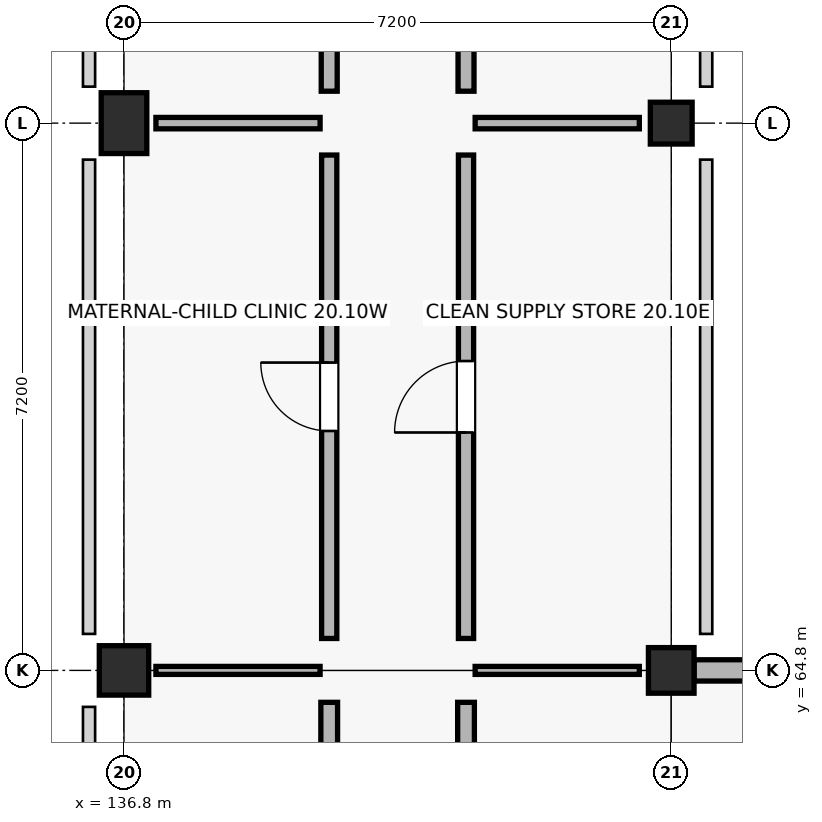
"""IFC4 building model, lengths in metres.
Left out: names, types, materials, properties, quantities, classifications, styles, units other than length and angle.
Written with IfcOpenShell. Run it as: python <this file> out.ifc"""

import sys

from ifc_helpers import new_model, si_unit, direction, frame, frame_2d, origin, origin_2d, place, context, subcontext, project, spatial, rectangle, circle, extrude, element, fill, save


model = new_model("IFC4")
c1 = context("Model", 3, precision=1e-05, world=origin(), true_north=direction((0.0, 1.0)))
c2 = subcontext(c1, "Body", "Model", "MODEL_VIEW")
j1 = project(units=[si_unit("LENGTHUNIT", "METRE"), si_unit("PLANEANGLEUNIT", "RADIAN")], contexts=[c1])
p1 = place(None, origin())
s1 = spatial("IfcSite", under=j1, at=p1, CompositionType="ELEMENT")
p2 = place(p1, origin())
s2 = spatial("IfcBuilding", under=s1, at=p2, CompositionType="ELEMENT")
p3 = place(p2, frame((0.0, 0.0, 4.5)))
s3 = spatial("IfcBuildingStorey", under=s2, at=p3, CompositionType="ELEMENT", Elevation=4.5)
p4 = place(p3, frame((136.8, 64.8, 0.0), z_axis=(0.0, 0.0, 1.0), x_axis=(1.0, 0.0, 0.0)))
e1 = element("IfcColumn", 1, at=p4, inside=s3, PredefinedType="COLUMN", context=c2, shape_type="SweptSolid", body=[
    extrude(circle(Radius=0.325, at=origin_2d()), origin(), (0.0, 0.0, 1.0), 4.5),
])
p5 = place(p3, frame((136.8, 72.0, 0.0), z_axis=(0.0, 0.0, 1.0), x_axis=(1.0, 0.0, 0.0)))
e2 = element("IfcColumn", 2, at=p5, inside=s3, PredefinedType="PILASTER", context=c2, shape_type="SweptSolid", body=[
    extrude(rectangle(XDim=0.6, YDim=0.8, at=origin_2d()), origin(), (0.0, 0.0, 1.0), 4.5),
])
p6 = place(p3, frame((144.0, 64.8, 0.0), z_axis=(0.0, 0.0, 1.0), x_axis=(1.0, 0.0, 0.0)))
e3 = element("IfcColumn", 3, at=p6, inside=s3, PredefinedType="COLUMN", context=c2, shape_type="SweptSolid", body=[
    extrude(rectangle(XDim=0.6, YDim=0.6, at=origin_2d()), origin(), (0.0, 0.0, 1.0), 4.5),
])
p7 = place(p3, frame((144.0, 72.0, 0.0), z_axis=(0.0, 0.0, 1.0), x_axis=(1.0, 0.0, 0.0)))
e4 = element("IfcColumn", 4, at=p7, inside=s3, PredefinedType="COLUMN", context=c2, shape_type="SweptSolid", body=[
    extrude(rectangle(XDim=0.55, YDim=0.55, at=origin_2d()), origin(), (0.0, 0.0, 1.0), 4.5),
])
p8 = place(p3, frame((150.9, 64.8, 0.0), z_axis=(0.0, 0.0, 1.0), x_axis=(-1.0, 0.0, 0.0)))
e5 = element("IfcWall", 5, at=p8, inside=s3, PredefinedType="STANDARD", context=c2, shape_type="SweptSolid", body=[
    extrude(rectangle(XDim=6.6, YDim=0.28, at=frame_2d((3.3, 0.0))), origin(), (0.0, 0.0, 1.0), 3.47),
])
p9 = place(p8, frame((0.775, 0.0, 0.9)))
e6 = element("IfcOpeningElement", 6, at=p9, cuts=e5, PredefinedType="OPENING", context=c2, shape_type="SweptSolid", body=[
    extrude(rectangle(XDim=1.95, YDim=1.75, at=frame_2d((0.975, 0.875))), frame((0.0, 0.15, 0.0), z_axis=(0.0, -1.0, 0.0), x_axis=(1.0, 0.0, 0.0)), (0.0, 0.0, 1.0), 0.3),
])
p10 = place(p8, frame((3.875, 0.0, 0.9)))
e7 = element("IfcOpeningElement", 7, at=p10, cuts=e5, PredefinedType="OPENING", context=c2, shape_type="SweptSolid", body=[
    extrude(rectangle(XDim=1.95, YDim=1.75, at=frame_2d((0.975, 0.875))), frame((0.0, 0.15, 0.0), z_axis=(0.0, -1.0, 0.0), x_axis=(1.0, 0.0, 0.0)), (0.0, 0.0, 1.0), 0.3),
])
p11 = place(p3, frame((139.5, 58.02, 0.0), z_axis=(0.0, 0.0, 1.0), x_axis=(0.0, 1.0, 0.0)))
e8 = element("IfcWall", 8, at=p11, inside=s3, PredefinedType="SOLIDWALL", context=c2, shape_type="SweptSolid", body=[
    extrude(rectangle(XDim=6.36, YDim=0.22, at=frame_2d((3.18, 0.0))), origin(), (0.0, 0.0, 1.0), 3.36),
])
p12 = place(p11, frame((2.45, 0.0, 0.0)))
e9 = element("IfcOpeningElement", 9, at=p12, cuts=e8, PredefinedType="OPENING", context=c2, shape_type="SweptSolid", body=[
    extrude(rectangle(XDim=1.46, YDim=2.09, at=frame_2d((0.73, 1.045))), frame((0.0, 0.12, 0.0), z_axis=(0.0, -1.0, 0.0), x_axis=(1.0, 0.0, 0.0)), (0.0, 0.0, 1.0), 0.24),
])
p13 = place(p3, frame((137.22, 64.8, 0.0), z_axis=(0.0, 0.0, 1.0), x_axis=(1.0, 0.0, 0.0)))
e10 = element("IfcWall", 10, at=p13, inside=s3, PredefinedType="PARTITIONING", context=c2, shape_type="SweptSolid", body=[
    extrude(rectangle(XDim=2.16, YDim=0.105, at=frame_2d((1.08, 0.0))), origin(), (0.0, 0.0, 1.0), 3.36),
])
p14 = place(p3, frame((141.3, 58.02, 0.0), z_axis=(0.0, 0.0, 1.0), x_axis=(0.0, 1.0, 0.0)))
e11 = element("IfcWall", 11, at=p14, inside=s3, PredefinedType="SOLIDWALL", context=c2, shape_type="SweptSolid", body=[
    extrude(rectangle(XDim=6.36, YDim=0.22, at=frame_2d((3.18, 0.0))), origin(), (0.0, 0.0, 1.0), 3.36),
])
p15 = place(p14, frame((2.43, 0.0, 0.0)))
e12 = element("IfcOpeningElement", 12, at=p15, cuts=e11, PredefinedType="OPENING", context=c2, shape_type="SweptSolid", body=[
    extrude(rectangle(XDim=1.5, YDim=2.09, at=frame_2d((0.75, 1.045))), frame((0.0, 0.12, 0.0), z_axis=(0.0, -1.0, 0.0), x_axis=(1.0, 0.0, 0.0)), (0.0, 0.0, 1.0), 0.24),
])
p16 = place(p3, frame((141.42, 64.8, 0.0), z_axis=(0.0, 0.0, 1.0), x_axis=(1.0, 0.0, 0.0)))
e13 = element("IfcWall", 13, at=p16, inside=s3, PredefinedType="PARTITIONING", context=c2, shape_type="SweptSolid", body=[
    extrude(rectangle(XDim=2.16, YDim=0.105, at=frame_2d((1.08, 0.0))), origin(), (0.0, 0.0, 1.0), 3.36),
])
p17 = place(p3, frame((139.5, 65.22, 0.0), z_axis=(0.0, 0.0, 1.0), x_axis=(0.0, 1.0, 0.0)))
e14 = element("IfcWall", 14, at=p17, inside=s3, PredefinedType="SOLIDWALL", context=c2, shape_type="SweptSolid", body=[
    extrude(rectangle(XDim=6.36, YDim=0.2, at=frame_2d((3.18, 0.0))), origin(), (0.0, 0.0, 1.0), 3.36),
])
p18 = place(p17, frame((2.73, 0.0, 0.0)))
e15 = element("IfcOpeningElement", 15, at=p18, cuts=e14, PredefinedType="OPENING", context=c2, shape_type="SweptSolid", body=[
    extrude(rectangle(XDim=0.9, YDim=2.14, at=frame_2d((0.45, 1.07))), frame((0.0, 0.11, 0.0), z_axis=(0.0, -1.0, 0.0), x_axis=(1.0, 0.0, 0.0)), (0.0, 0.0, 1.0), 0.22),
])
p19 = place(p3, frame((137.22, 72.0, 0.0), z_axis=(0.0, 0.0, 1.0), x_axis=(1.0, 0.0, 0.0)))
e16 = element("IfcWall", 16, at=p19, inside=s3, PredefinedType="PARTITIONING", context=c2, shape_type="SweptSolid", body=[
    extrude(rectangle(XDim=2.16, YDim=0.15, at=frame_2d((1.08, 0.0))), origin(), (0.0, 0.0, 1.0), 3.36),
])
p20 = place(p3, frame((141.3, 65.22, 0.0), z_axis=(0.0, 0.0, 1.0), x_axis=(0.0, 1.0, 0.0)))
e17 = element("IfcWall", 17, at=p20, inside=s3, PredefinedType="SOLIDWALL", context=c2, shape_type="SweptSolid", body=[
    extrude(rectangle(XDim=6.36, YDim=0.2, at=frame_2d((3.18, 0.0))), origin(), (0.0, 0.0, 1.0), 3.36),
])
p21 = place(p20, frame((2.71, 0.0, 0.0)))
e18 = element("IfcOpeningElement", 18, at=p21, cuts=e17, PredefinedType="OPENING", context=c2, shape_type="SweptSolid", body=[
    extrude(rectangle(XDim=0.94, YDim=2.14, at=frame_2d((0.47, 1.07))), frame((0.0, 0.11, 0.0), z_axis=(0.0, -1.0, 0.0), x_axis=(1.0, 0.0, 0.0)), (0.0, 0.0, 1.0), 0.22),
])
p22 = place(p3, frame((141.42, 72.0, 0.0), z_axis=(0.0, 0.0, 1.0), x_axis=(1.0, 0.0, 0.0)))
e19 = element("IfcWall", 19, at=p22, inside=s3, PredefinedType="PARTITIONING", context=c2, shape_type="SweptSolid", body=[
    extrude(rectangle(XDim=2.16, YDim=0.15, at=frame_2d((1.08, 0.0))), origin(), (0.0, 0.0, 1.0), 3.36),
])
p23 = place(p3, frame((139.5, 72.42, 0.0), z_axis=(0.0, 0.0, 1.0), x_axis=(0.0, 1.0, 0.0)))
e20 = element("IfcWall", 20, at=p23, inside=s3, PredefinedType="PLUMBINGWALL", context=c2, shape_type="SweptSolid", body=[
    extrude(rectangle(XDim=6.36, YDim=0.21, at=frame_2d((3.18, 0.0))), origin(), (0.0, 0.0, 1.0), 3.36),
])
p24 = place(p23, frame((2.69, 0.0, 0.0)))
e21 = element("IfcOpeningElement", 21, at=p24, cuts=e20, PredefinedType="OPENING", context=c2, shape_type="SweptSolid", body=[
    extrude(rectangle(XDim=0.98, YDim=2.14, at=frame_2d((0.49, 1.07))), frame((0.0, 0.115, 0.0), z_axis=(0.0, -1.0, 0.0), x_axis=(1.0, 0.0, 0.0)), (0.0, 0.0, 1.0), 0.23),
])
p25 = place(p3, frame((141.3, 72.42, 0.0), z_axis=(0.0, 0.0, 1.0), x_axis=(0.0, 1.0, 0.0)))
e22 = element("IfcWall", 22, at=p25, inside=s3, PredefinedType="PLUMBINGWALL", context=c2, shape_type="SweptSolid", body=[
    extrude(rectangle(XDim=6.36, YDim=0.21, at=frame_2d((3.18, 0.0))), origin(), (0.0, 0.0, 1.0), 3.36),
])
p26 = place(p25, frame((2.67, 0.0, 0.0)))
e23 = element("IfcOpeningElement", 23, at=p26, cuts=e22, PredefinedType="OPENING", context=c2, shape_type="SweptSolid", body=[
    extrude(rectangle(XDim=1.02, YDim=2.14, at=frame_2d((0.51, 1.07))), frame((0.0, 0.115, 0.0), z_axis=(0.0, -1.0, 0.0), x_axis=(1.0, 0.0, 0.0)), (0.0, 0.0, 1.0), 0.23),
])
p27 = place(p18, origin())
e24 = element("IfcDoor", 24, at=p27, inside=s3, OperationType="SINGLE_SWING_RIGHT", PredefinedType="DOOR", context=c2, shape_type="SweptSolid", body=[
    extrude(rectangle(XDim=0.9, YDim=2.14, at=frame_2d((0.45, 1.07))), frame((0.0, 0.025, 0.0), z_axis=(0.0, -1.0, 0.0), x_axis=(1.0, 0.0, 0.0)), (0.0, 0.0, 1.0), 0.05),
])
fill(e15, e24)
p28 = place(p21, origin())
e25 = element("IfcDoor", 25, at=p28, inside=s3, OperationType="SINGLE_SWING_LEFT", PredefinedType="DOOR", context=c2, shape_type="SweptSolid", body=[
    extrude(rectangle(XDim=0.94, YDim=2.14, at=frame_2d((0.47, 1.07))), frame((0.0, 0.025, 0.0), z_axis=(0.0, -1.0, 0.0), x_axis=(1.0, 0.0, 0.0)), (0.0, 0.0, 1.0), 0.05),
])
fill(e18, e25)
save(model, sys.argv[1])
